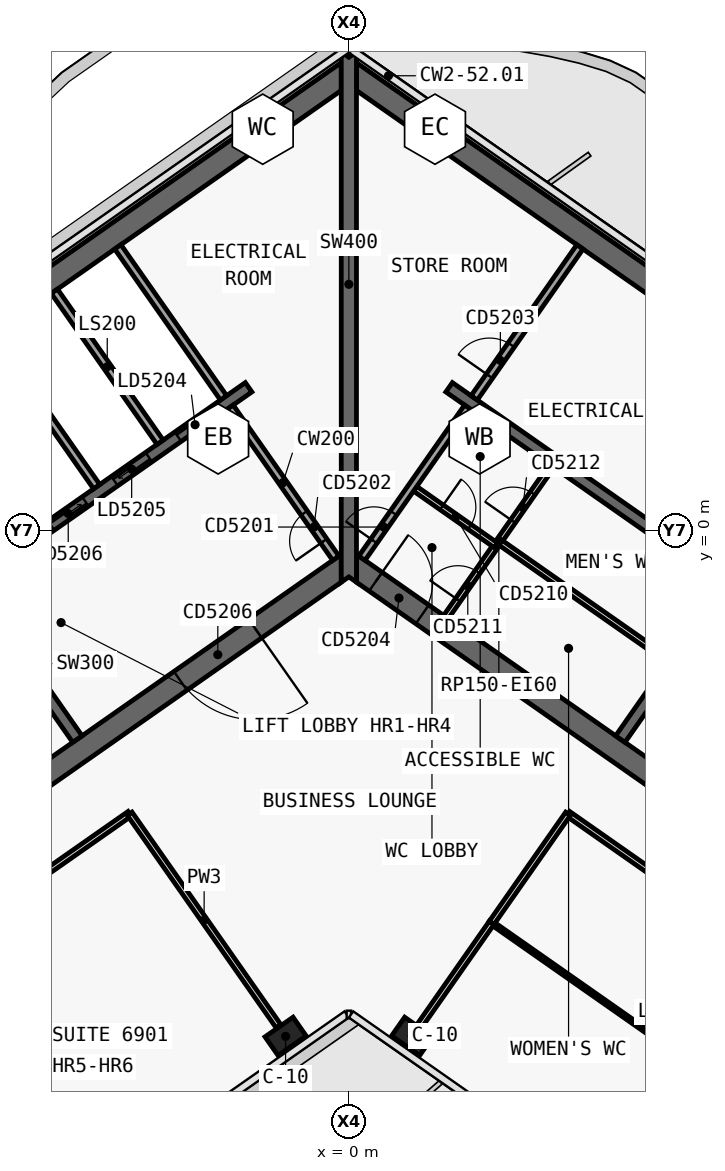
"""IFC4 building model, lengths in metres.
Left out: names, types, materials, properties, quantities, classifications, styles, units other than length and angle.
Written with IfcOpenShell. Run it as: python <this file> out.ifc"""

import sys

from ifc_helpers import new_model, si_unit, direction, frame, frame_2d, origin, origin_2d, place, context, subcontext, project, spatial, polyline, rectangle, outline, extrude, element, fill, save


model = new_model("IFC4")
c1 = context("Model", 3, precision=1e-05, world=origin(), true_north=direction((0.0, 1.0)))
c2 = subcontext(c1, "Body", "Model", "MODEL_VIEW")
j1 = project(units=[si_unit("LENGTHUNIT", "METRE"), si_unit("PLANEANGLEUNIT", "RADIAN")], contexts=[c1])
p1 = place(None, origin())
s1 = spatial("IfcSite", under=j1, at=p1, CompositionType="ELEMENT")
p2 = place(p1, origin())
s2 = spatial("IfcBuilding", under=s1, at=p2, CompositionType="ELEMENT")
p3 = place(p2, frame((0.0, 0.0, 291.7)))
s3 = spatial("IfcBuildingStorey", under=s2, at=p3, CompositionType="ELEMENT", Elevation=291.7)
p4 = place(p3, frame((-0.028, 12.066, 0.0), z_axis=(0.0, 0.0, 1.0), x_axis=(-0.819151382952, -0.573577380837, 0.0)))
e1 = element("IfcWall", 1, at=p4, inside=s3, PredefinedType="SHEAR", context=c2, shape_type="SweptSolid", body=[
    extrude(outline(polyline([(33.898, 0.3), (0.42, 0.3), (0.0, -0.3), (33.898, -0.3), (33.898, 0.3)])), origin(), (0.0, 0.0, 1.0), 3.9),
])
p5 = place(p3, frame((-0.028, -0.874, 0.0), z_axis=(0.0, 0.0, 1.0), x_axis=(-0.819150035022, -0.573579305871, 0.0)))
e2 = element("IfcWall", 2, at=p5, inside=s3, PredefinedType="SHEAR", context=c2, shape_type="SweptSolid", body=[
    extrude(outline(polyline([(26.476, 0.3), (0.42, 0.3), (0.0, -0.3), (26.476, -0.3), (26.476, 0.3)])), origin(), (0.0, 0.0, 1.0), 3.9),
])
p6 = place(p5, frame((2.976, 0.0, 0.0)))
e3 = element("IfcOpeningElement", 3, at=p6, cuts=e2, PredefinedType="OPENING", context=c2, shape_type="SweptSolid", body=[
    extrude(rectangle(XDim=2.4, YDim=2.1, at=frame_2d((1.2, 1.05))), frame((0.0, 0.31, 0.0), z_axis=(0.0, -1.0, 0.0), x_axis=(1.0, 0.0, 0.0)), (0.0, 0.0, 1.0), 0.62),
])
p7 = place(p5, frame((11.776, 0.0, 0.0)))
e4 = element("IfcOpeningElement", 4, at=p7, cuts=e2, PredefinedType="OPENING", context=c2, shape_type="SweptSolid", body=[
    extrude(rectangle(XDim=2.4, YDim=2.1, at=frame_2d((1.2, 1.05))), frame((0.0, 0.31, 0.0), z_axis=(0.0, -1.0, 0.0), x_axis=(1.0, 0.0, 0.0)), (0.0, 0.0, 1.0), 0.62),
])
p8 = place(p3, frame((-7.143, -5.49, 0.0), z_axis=(0.0, 0.0, 1.0), x_axis=(-0.573617744349, 0.819123118565, 0.0)))
e5 = element("IfcWall", 5, at=p8, inside=s3, PredefinedType="SHEAR", context=c2, shape_type="SweptSolid", body=[
    extrude(outline(polyline([(4.85, 0.15), (0.0, 0.15), (0.0, -0.15), (4.85, -0.15), (4.85, 0.15)])), origin(), (0.0, 0.0, 1.0), 3.9),
])
p9 = place(p3, frame((-2.638, 3.768, 0.0), z_axis=(0.0, 0.0, 1.0), x_axis=(-0.819155014212, -0.573572194837, 0.0)))
e6 = element("IfcWall", 6, at=p9, inside=s3, PredefinedType="SHEAR", context=c2, shape_type="SweptSolid", body=[
    extrude(outline(polyline([(26.4, 0.15), (0.0, 0.15), (0.0, -0.15), (26.4, -0.15), (26.4, 0.15)])), origin(), (0.0, 0.0, 1.0), 3.9),
])
p10 = place(p9, frame((1.169, 0.0, 0.0)))
e7 = element("IfcOpeningElement", 7, at=p10, cuts=e6, PredefinedType="OPENING", context=c2, shape_type="SweptSolid", body=[
    extrude(rectangle(XDim=1.1, YDim=2.1, at=frame_2d((0.55, 1.05))), frame((0.0, 0.16, 0.0), z_axis=(0.0, -1.0, 0.0), x_axis=(1.0, 0.0, 0.0)), (0.0, 0.0, 1.0), 0.32),
])
p11 = place(p9, frame((3.206, 0.0, 0.0)))
e8 = element("IfcOpeningElement", 8, at=p11, cuts=e6, PredefinedType="OPENING", context=c2, shape_type="SweptSolid", body=[
    extrude(rectangle(XDim=1.1, YDim=2.1, at=frame_2d((0.55, 1.05))), frame((0.0, 0.16, 0.0), z_axis=(0.0, -1.0, 0.0), x_axis=(1.0, 0.0, 0.0)), (0.0, 0.0, 1.0), 0.32),
])
p12 = place(p9, frame((5.244, 0.0, 0.0)))
e9 = element("IfcOpeningElement", 9, at=p12, cuts=e6, PredefinedType="OPENING", context=c2, shape_type="SweptSolid", body=[
    extrude(rectangle(XDim=1.1, YDim=2.1, at=frame_2d((0.55, 1.05))), frame((0.0, 0.16, 0.0), z_axis=(0.0, -1.0, 0.0), x_axis=(1.0, 0.0, 0.0)), (0.0, 0.0, 1.0), 0.32),
])
p13 = place(p9, frame((7.281, 0.0, 0.0)))
e10 = element("IfcOpeningElement", 10, at=p13, cuts=e6, PredefinedType="OPENING", context=c2, shape_type="SweptSolid", body=[
    extrude(rectangle(XDim=1.1, YDim=2.1, at=frame_2d((0.55, 1.05))), frame((0.0, 0.16, 0.0), z_axis=(0.0, -1.0, 0.0), x_axis=(1.0, 0.0, 0.0)), (0.0, 0.0, 1.0), 0.32),
])
p14 = place(p9, frame((9.688, 0.0, 0.0)))
e11 = element("IfcOpeningElement", 11, at=p14, cuts=e6, PredefinedType="OPENING", context=c2, shape_type="SweptSolid", body=[
    extrude(rectangle(XDim=1.1, YDim=2.1, at=frame_2d((0.55, 1.05))), frame((0.0, 0.16, 0.0), z_axis=(0.0, -1.0, 0.0), x_axis=(1.0, 0.0, 0.0)), (0.0, 0.0, 1.0), 0.32),
])
p15 = place(p9, frame((11.863, 0.0, 0.0)))
e12 = element("IfcOpeningElement", 12, at=p15, cuts=e6, PredefinedType="OPENING", context=c2, shape_type="SweptSolid", body=[
    extrude(rectangle(XDim=1.1, YDim=2.1, at=frame_2d((0.55, 1.05))), frame((0.0, 0.16, 0.0), z_axis=(0.0, -1.0, 0.0), x_axis=(1.0, 0.0, 0.0)), (0.0, 0.0, 1.0), 0.32),
])
p16 = place(p9, frame((15.175, 0.0, 0.0)))
e13 = element("IfcOpeningElement", 13, at=p16, cuts=e6, PredefinedType="OPENING", context=c2, shape_type="SweptSolid", body=[
    extrude(rectangle(XDim=1.0, YDim=2.1, at=frame_2d((0.5, 1.05))), frame((0.0, 0.16, 0.0), z_axis=(0.0, -1.0, 0.0), x_axis=(1.0, 0.0, 0.0)), (0.0, 0.0, 1.0), 0.32),
])
p17 = place(p3, frame((0.028, 12.066, 0.0), z_axis=(0.0, 0.0, 1.0), x_axis=(0.819151382952, -0.573577380837, 0.0)))
e14 = element("IfcWall", 14, at=p17, inside=s3, PredefinedType="SHEAR", context=c2, shape_type="SweptSolid", body=[
    extrude(outline(polyline([(33.898, 0.3), (0.0, 0.3), (0.42, -0.3), (33.898, -0.3), (33.898, 0.3)])), origin(), (0.0, 0.0, 1.0), 3.9),
])
p18 = place(p3, frame((0.028, -0.874, 0.0), z_axis=(0.0, 0.0, 1.0), x_axis=(0.819150035022, -0.573579305871, 0.0)))
e15 = element("IfcWall", 15, at=p18, inside=s3, PredefinedType="SHEAR", context=c2, shape_type="SweptSolid", body=[
    extrude(outline(polyline([(26.476, 0.3), (0.0, 0.3), (0.42, -0.3), (26.476, -0.3), (26.476, 0.3)])), origin(), (0.0, 0.0, 1.0), 3.9),
])
p19 = place(p18, frame((0.826, 0.0, 0.0)))
e16 = element("IfcOpeningElement", 16, at=p19, cuts=e15, PredefinedType="OPENING", context=c2, shape_type="SweptSolid", body=[
    extrude(rectangle(XDim=1.5, YDim=2.1, at=frame_2d((0.75, 1.05))), frame((0.0, 0.31, 0.0), z_axis=(0.0, -1.0, 0.0), x_axis=(1.0, 0.0, 0.0)), (0.0, 0.0, 1.0), 0.62),
])
p20 = place(p18, frame((12.226, 0.0, 0.0)))
e17 = element("IfcOpeningElement", 17, at=p20, cuts=e15, PredefinedType="OPENING", context=c2, shape_type="SweptSolid", body=[
    extrude(rectangle(XDim=1.5, YDim=2.1, at=frame_2d((0.75, 1.05))), frame((0.0, 0.31, 0.0), z_axis=(0.0, -1.0, 0.0), x_axis=(1.0, 0.0, 0.0)), (0.0, 0.0, 1.0), 0.62),
])
p21 = place(p3, frame((7.143, -5.49, 0.0), z_axis=(0.0, 0.0, 1.0), x_axis=(0.573617744349, 0.819123118565, 0.0)))
e18 = element("IfcWall", 18, at=p21, inside=s3, PredefinedType="SHEAR", context=c2, shape_type="SweptSolid", body=[
    extrude(outline(polyline([(0.0, 0.15), (0.0, -0.15), (4.85, -0.15), (4.85, 0.15), (0.0, 0.15)])), origin(), (0.0, 0.0, 1.0), 3.9),
])
p22 = place(p3, frame((2.638, 3.768, 0.0), z_axis=(0.0, 0.0, 1.0), x_axis=(0.819155014212, -0.573572194837, 0.0)))
e19 = element("IfcWall", 19, at=p22, inside=s3, PredefinedType="SHEAR", context=c2, shape_type="SweptSolid", body=[
    extrude(outline(polyline([(0.0, 0.15), (0.0, -0.15), (26.4, -0.15), (26.4, 0.15), (0.0, 0.15)])), origin(), (0.0, 0.0, 1.0), 3.9),
])
p23 = place(p22, frame((9.637, 0.0, 0.0)))
e20 = element("IfcOpeningElement", 20, at=p23, cuts=e19, PredefinedType="OPENING", context=c2, shape_type="SweptSolid", body=[
    extrude(rectangle(XDim=1.2, YDim=2.1, at=frame_2d((0.6, 1.05))), frame((0.0, 0.16, 0.0), z_axis=(0.0, -1.0, 0.0), x_axis=(1.0, 0.0, 0.0)), (0.0, 0.0, 1.0), 0.32),
])
p24 = place(p22, frame((11.812, 0.0, 0.0)))
e21 = element("IfcOpeningElement", 21, at=p24, cuts=e19, PredefinedType="OPENING", context=c2, shape_type="SweptSolid", body=[
    extrude(rectangle(XDim=1.2, YDim=2.1, at=frame_2d((0.6, 1.05))), frame((0.0, 0.16, 0.0), z_axis=(0.0, -1.0, 0.0), x_axis=(1.0, 0.0, 0.0)), (0.0, 0.0, 1.0), 0.32),
])
p25 = place(p22, frame((13.988, 0.0, 0.0)))
e22 = element("IfcOpeningElement", 22, at=p25, cuts=e19, PredefinedType="OPENING", context=c2, shape_type="SweptSolid", body=[
    extrude(rectangle(XDim=1.2, YDim=2.1, at=frame_2d((0.6, 1.05))), frame((0.0, 0.16, 0.0), z_axis=(0.0, -1.0, 0.0), x_axis=(1.0, 0.0, 0.0)), (0.0, 0.0, 1.0), 0.32),
])
p26 = place(p22, frame((16.262, 0.0, 0.0)))
e23 = element("IfcOpeningElement", 23, at=p26, cuts=e19, PredefinedType="OPENING", context=c2, shape_type="SweptSolid", body=[
    extrude(rectangle(XDim=1.0, YDim=2.1, at=frame_2d((0.5, 1.05))), frame((0.0, 0.16, 0.0), z_axis=(0.0, -1.0, 0.0), x_axis=(1.0, 0.0, 0.0)), (0.0, 0.0, 1.0), 0.32),
])
p27 = place(p3, frame((0.0, -1.361, 0.0), z_axis=(0.0, 0.0, 1.0), x_axis=(0.0, 1.0, 0.0)))
e24 = element("IfcWall", 24, at=p27, inside=s3, PredefinedType="SHEAR", context=c2, shape_type="SweptSolid", body=[
    extrude(outline(polyline([(0.14, 0.2), (0.0, 0.2), (0.14, 0.0), (0.0, -0.2), (0.14, -0.2), (1.012, -0.2), (12.94, -0.2), (13.813, -0.2), (13.893, -0.2), (13.933, -0.172), (13.813, 0.0), (13.933, 0.172), (13.893, 0.2), (13.813, 0.2), (12.94, 0.2), (1.012, 0.2), (0.14, 0.2)])), origin(), (0.0, 0.0, 1.0), 3.9),
])
for number, where, z_axis, x_axis in (
    (25, (-1.665, -13.313, 0.0), (0.0, 0.0, 1.0), (-0.819, -0.574, 0.0)),
    (26, (1.665, -13.313, 0.0), (0.0, 0.0, 1.0), (0.819, -0.574, 0.0)),
):
    element("IfcColumn", number, at=place(p3, frame(where, z_axis=z_axis, x_axis=x_axis)), inside=s3, PredefinedType="COLUMN", context=c2, shape_type="SweptSolid", body=[
        extrude(rectangle(XDim=0.9, YDim=0.6, at=origin_2d()), origin(), (0.0, 0.0, 1.0), 3.9),
    ])
p28 = place(p3, frame((-4.967, 2.321, 0.0), z_axis=(0.0, 0.0, 1.0), x_axis=(-0.573594092424, 0.81913968109, 0.0)))
e27 = element("IfcWall", 27, at=p28, inside=s3, PredefinedType="SOLIDWALL", context=c2, shape_type="SweptSolid", body=[
    extrude(rectangle(XDim=4.85, YDim=0.2, at=frame_2d((2.425, 0.0))), origin(), (0.0, 0.0, 1.0), 3.9),
])
p29 = place(p3, frame((-6.636, 1.152, 0.0), z_axis=(0.0, 0.0, 1.0), x_axis=(-0.573560315113, 0.819163332265, 0.0)))
e28 = element("IfcWall", 28, at=p29, inside=s3, PredefinedType="SOLIDWALL", context=c2, shape_type="SweptSolid", body=[
    extrude(rectangle(XDim=4.85, YDim=0.2, at=frame_2d((2.425, 0.0))), origin(), (0.0, 0.0, 1.0), 3.9),
])
p30 = place(p3, frame((2.556, -2.278, 0.0), z_axis=(0.0, 0.0, 1.0), x_axis=(0.573560315113, 0.819163332265, 0.0)))
e29 = element("IfcWall", 29, at=p30, inside=s3, PredefinedType="PARTITIONING", context=c2, shape_type="SweptSolid", body=[
    extrude(rectangle(XDim=4.85, YDim=0.15, at=frame_2d((2.425, 0.0))), origin(), (0.0, 0.0, 1.0), 3.62),
])
p31 = place(p30, frame((0.55, 0.0, 0.0)))
e30 = element("IfcOpeningElement", 30, at=p31, cuts=e29, PredefinedType="OPENING", context=c2, shape_type="SweptSolid", body=[
    extrude(rectangle(XDim=0.9, YDim=2.1, at=frame_2d((0.45, 1.05))), frame((0.0, 0.085, 0.0), z_axis=(0.0, -1.0, 0.0), x_axis=(1.0, 0.0, 0.0)), (0.0, 0.0, 1.0), 0.17),
])
p32 = place(p30, frame((3.075, 0.0, 0.0)))
e31 = element("IfcOpeningElement", 31, at=p32, cuts=e29, PredefinedType="OPENING", context=c2, shape_type="SweptSolid", body=[
    extrude(rectangle(XDim=0.9, YDim=2.1, at=frame_2d((0.45, 1.05))), frame((0.0, 0.085, 0.0), z_axis=(0.0, -1.0, 0.0), x_axis=(1.0, 0.0, 0.0)), (0.0, 0.0, 1.0), 0.17),
])
p33 = place(p3, frame((1.745, 1.097, 0.0), z_axis=(0.0, 0.0, 1.0), x_axis=(0.819178980414, -0.573537965655, 0.0)))
e32 = element("IfcWall", 32, at=p33, inside=s3, PredefinedType="PARTITIONING", context=c2, shape_type="SweptSolid", body=[
    extrude(rectangle(XDim=2.6, YDim=0.15, at=frame_2d((1.3, 0.0))), origin(), (0.0, 0.0, 1.0), 3.62),
])
p34 = place(p33, frame((0.85, 0.0, 0.0)))
e33 = element("IfcOpeningElement", 33, at=p34, cuts=e32, PredefinedType="OPENING", context=c2, shape_type="SweptSolid", body=[
    extrude(rectangle(XDim=0.9, YDim=2.1, at=frame_2d((0.45, 1.05))), frame((0.0, 0.085, 0.0), z_axis=(0.0, -1.0, 0.0), x_axis=(1.0, 0.0, 0.0)), (0.0, 0.0, 1.0), 0.17),
])
p35 = place(p3, frame((3.947, -0.292, 0.0), z_axis=(0.0, 0.0, 1.0), x_axis=(0.819151939971, -0.573576585332, 0.0)))
e34 = element("IfcWall", 34, at=p35, inside=s3, PredefinedType="PARTITIONING", context=c2, shape_type="SweptSolid", body=[
    extrude(rectangle(XDim=5.45, YDim=0.15, at=frame_2d((2.725, 0.0))), origin(), (0.0, 0.0, 1.0), 3.62),
])
p36 = place(p3, frame((-0.344, -0.729, 0.0), z_axis=(0.0, 0.0, 1.0), x_axis=(-0.573560315113, 0.819163332265, 0.0)))
e35 = element("IfcWall", 35, at=p36, inside=s3, PredefinedType="SOLIDWALL", context=c2, shape_type="SweptSolid", body=[
    extrude(rectangle(XDim=4.85, YDim=0.2, at=frame_2d((2.425, 0.0))), origin(), (0.0, 0.0, 1.0), 3.62),
])
p37 = place(p36, frame((0.55, 0.0, 0.0)))
e36 = element("IfcOpeningElement", 36, at=p37, cuts=e35, PredefinedType="OPENING", context=c2, shape_type="SweptSolid", body=[
    extrude(rectangle(XDim=0.9, YDim=2.1, at=frame_2d((0.45, 1.05))), frame((0.0, 0.11, 0.0), z_axis=(0.0, -1.0, 0.0), x_axis=(1.0, 0.0, 0.0)), (0.0, 0.0, 1.0), 0.22),
])
p38 = place(p3, frame((-3.298, 3.49, 0.0), z_axis=(0.0, 0.0, 1.0), x_axis=(-0.573560315113, 0.819163332265, 0.0)))
e37 = element("IfcWall", 37, at=p38, inside=s3, PredefinedType="SOLIDWALL", context=c2, shape_type="SweptSolid", body=[
    extrude(rectangle(XDim=4.85, YDim=0.2, at=frame_2d((2.425, 0.0))), origin(), (0.0, 0.0, 1.0), 3.62),
])
p39 = place(p3, frame((0.344, -0.729, 0.0), z_axis=(0.0, 0.0, 1.0), x_axis=(0.573560315113, 0.819163332265, 0.0)))
e38 = element("IfcWall", 38, at=p39, inside=s3, PredefinedType="SOLIDWALL", context=c2, shape_type="SweptSolid", body=[
    extrude(rectangle(XDim=4.85, YDim=0.2, at=frame_2d((2.425, 0.0))), origin(), (0.0, 0.0, 1.0), 3.62),
])
p40 = place(p39, frame((0.55, 0.0, 0.0)))
e39 = element("IfcOpeningElement", 39, at=p40, cuts=e38, PredefinedType="OPENING", context=c2, shape_type="SweptSolid", body=[
    extrude(rectangle(XDim=0.9, YDim=2.1, at=frame_2d((0.45, 1.05))), frame((0.0, 0.11, 0.0), z_axis=(0.0, -1.0, 0.0), x_axis=(1.0, 0.0, 0.0)), (0.0, 0.0, 1.0), 0.22),
])
p41 = place(p3, frame((3.298, 3.49, 0.0), z_axis=(0.0, 0.0, 1.0), x_axis=(0.573560315113, 0.819163332265, 0.0)))
e40 = element("IfcWall", 40, at=p41, inside=s3, PredefinedType="SOLIDWALL", context=c2, shape_type="SweptSolid", body=[
    extrude(rectangle(XDim=4.85, YDim=0.2, at=frame_2d((2.425, 0.0))), origin(), (0.0, 0.0, 1.0), 3.62),
])
p42 = place(p41, frame((0.7, 0.0, 0.0)))
e41 = element("IfcOpeningElement", 41, at=p42, cuts=e40, PredefinedType="OPENING", context=c2, shape_type="SweptSolid", body=[
    extrude(rectangle(XDim=1.0, YDim=2.1, at=frame_2d((0.5, 1.05))), frame((0.0, 0.11, 0.0), z_axis=(0.0, -1.0, 0.0), x_axis=(1.0, 0.0, 0.0)), (0.0, 0.0, 1.0), 0.22),
])
p43 = place(p3, frame((15.598, -14.34, 0.0), z_axis=(0.0, 0.0, 1.0), x_axis=(-0.81915546166, 0.573571555809, 0.0)))
e42 = element("IfcWall", 42, at=p43, inside=s3, PredefinedType="PARTITIONING", context=c2, shape_type="SweptSolid", body=[
    extrude(rectangle(XDim=12.002, YDim=0.15, at=frame_2d((6.001, 0.0))), origin(), (0.0, 0.0, 1.0), 3.05),
])
p44 = place(p43, frame((5.201, 0.0, 0.0)))
e43 = element("IfcOpeningElement", 43, at=p44, cuts=e42, PredefinedType="OPENING", context=c2, shape_type="SweptSolid", body=[
    extrude(rectangle(XDim=1.6, YDim=2.1, at=frame_2d((0.8, 1.05))), frame((0.0, 0.085, 0.0), z_axis=(0.0, -1.0, 0.0), x_axis=(1.0, 0.0, 0.0)), (0.0, 0.0, 1.0), 0.17),
])
p45 = place(p3, frame((-5.766, -7.456, 0.0), z_axis=(0.0, 0.0, 1.0), x_axis=(-0.81915291695, -0.57357519006, 0.0)))
e44 = element("IfcWall", 44, at=p45, inside=s3, PredefinedType="PARTITIONING", context=c2, shape_type="SweptSolid", body=[
    extrude(rectangle(XDim=9.002, YDim=0.15, at=frame_2d((4.501, 0.0))), origin(), (0.0, 0.0, 1.0), 3.05),
])
p46 = place(p45, frame((3.701, 0.0, 0.0)))
e45 = element("IfcOpeningElement", 45, at=p46, cuts=e44, PredefinedType="OPENING", context=c2, shape_type="SweptSolid", body=[
    extrude(rectangle(XDim=1.6, YDim=2.1, at=frame_2d((0.8, 1.05))), frame((0.0, 0.085, 0.0), z_axis=(0.0, -1.0, 0.0), x_axis=(1.0, 0.0, 0.0)), (0.0, 0.0, 1.0), 0.17),
])
p47 = place(p3, frame((13.588, -17.207, 0.0), z_axis=(0.0, 0.0, 1.0), x_axis=(-0.819156404271, 0.573570209602, 0.0)))
e46 = element("IfcWall", 46, at=p47, inside=s3, PredefinedType="PARTITIONING", context=c2, shape_type="SweptSolid", body=[
    extrude(rectangle(XDim=12.0, YDim=0.1, at=frame_2d((6.0, 0.0))), origin(), (0.0, 0.0, 1.0), 3.05),
])
p48 = place(p47, frame((5.55, 0.0, 0.0)))
e47 = element("IfcOpeningElement", 47, at=p48, cuts=e46, PredefinedType="OPENING", context=c2, shape_type="SweptSolid", body=[
    extrude(rectangle(XDim=0.9, YDim=2.1, at=frame_2d((0.45, 1.05))), frame((0.0, 0.06, 0.0), z_axis=(0.0, -1.0, 0.0), x_axis=(1.0, 0.0, 0.0)), (0.0, 0.0, 1.0), 0.12),
])
p49 = place(p3, frame((1.849, -13.051, 0.0), z_axis=(0.0, 0.0, 1.0), x_axis=(0.573595235521, 0.819138880647, 0.0)))
e48 = element("IfcWall", 48, at=p49, inside=s3, PredefinedType="PARTITIONING", context=c2, shape_type="SweptSolid", body=[
    extrude(rectangle(XDim=3.329, YDim=0.15, at=frame_2d((1.665, 0.0))), origin(), (0.0, 0.0, 1.0), 3.05),
])
p50 = place(p3, frame((3.759, -10.323, 0.0), z_axis=(0.0, 0.0, 1.0), x_axis=(0.573598101901, 0.81913687348, 0.0)))
e49 = element("IfcWall", 49, at=p50, inside=s3, PredefinedType="PARTITIONING", context=c2, shape_type="SweptSolid", body=[
    extrude(rectangle(XDim=3.5, YDim=0.15, at=frame_2d((1.75, 0.0))), origin(), (0.0, 0.0, 1.0), 3.05),
])
p51 = place(p3, frame((-1.849, -13.051, 0.0), z_axis=(0.0, 0.0, 1.0), x_axis=(-0.57357985571, 0.819149650018, 0.0)))
e50 = element("IfcWall", 50, at=p51, inside=s3, PredefinedType="PARTITIONING", context=c2, shape_type="SweptSolid", body=[
    extrude(rectangle(XDim=6.832, YDim=0.15, at=frame_2d((3.416, 0.0))), origin(), (0.0, 0.0, 1.0), 3.05),
])
p52 = place(p10, origin())
e51 = element("IfcDoor", 51, at=p52, inside=s3, OperationType="SLIDING_TO_LEFT", PredefinedType="DOOR", context=c2, shape_type="SweptSolid", body=[
    extrude(rectangle(XDim=1.1, YDim=2.1, at=frame_2d((0.55, 1.05))), frame((0.0, 0.025, 0.0), z_axis=(0.0, -1.0, 0.0), x_axis=(1.0, 0.0, 0.0)), (0.0, 0.0, 1.0), 0.05),
])
fill(e7, e51)
p53 = place(p11, origin())
e52 = element("IfcDoor", 52, at=p53, inside=s3, OperationType="SLIDING_TO_RIGHT", PredefinedType="DOOR", context=c2, shape_type="SweptSolid", body=[
    extrude(rectangle(XDim=1.1, YDim=2.1, at=frame_2d((0.55, 1.05))), frame((0.0, 0.025, 0.0), z_axis=(0.0, -1.0, 0.0), x_axis=(1.0, 0.0, 0.0)), (0.0, 0.0, 1.0), 0.05),
])
fill(e8, e52)
p54 = place(p12, origin())
e53 = element("IfcDoor", 53, at=p54, inside=s3, OperationType="SLIDING_TO_LEFT", PredefinedType="DOOR", context=c2, shape_type="SweptSolid", body=[
    extrude(rectangle(XDim=1.1, YDim=2.1, at=frame_2d((0.55, 1.05))), frame((0.0, 0.025, 0.0), z_axis=(0.0, -1.0, 0.0), x_axis=(1.0, 0.0, 0.0)), (0.0, 0.0, 1.0), 0.05),
])
fill(e9, e53)
p55 = place(p6, origin())
e54 = element("IfcDoor", 54, at=p55, inside=s3, OperationType="DOUBLE_DOOR_SINGLE_SWING", PredefinedType="DOOR", context=c2, shape_type="SweptSolid", body=[
    extrude(rectangle(XDim=2.4, YDim=2.1, at=frame_2d((1.2, 1.05))), frame((0.0, 0.025, 0.0), z_axis=(0.0, -1.0, 0.0), x_axis=(1.0, 0.0, 0.0)), (0.0, 0.0, 1.0), 0.05),
])
fill(e3, e54)
p56 = place(p31, origin())
e55 = element("IfcDoor", 55, at=p56, inside=s3, OperationType="SINGLE_SWING_RIGHT", PredefinedType="DOOR", context=c2, shape_type="SweptSolid", body=[
    extrude(rectangle(XDim=0.9, YDim=2.1, at=frame_2d((0.45, 1.05))), frame((0.0, 0.025, 0.0), z_axis=(0.0, -1.0, 0.0), x_axis=(1.0, 0.0, 0.0)), (0.0, 0.0, 1.0), 0.05),
])
fill(e30, e55)
p57 = place(p34, origin())
e56 = element("IfcDoor", 56, at=p57, inside=s3, OperationType="SINGLE_SWING_RIGHT", PredefinedType="DOOR", context=c2, shape_type="SweptSolid", body=[
    extrude(rectangle(XDim=0.9, YDim=2.1, at=frame_2d((0.45, 1.05))), frame((0.0, 0.025, 0.0), z_axis=(0.0, -1.0, 0.0), x_axis=(1.0, 0.0, 0.0)), (0.0, 0.0, 1.0), 0.05),
])
fill(e33, e56)
p58 = place(p32, origin())
e57 = element("IfcDoor", 57, at=p58, inside=s3, OperationType="SINGLE_SWING_RIGHT", PredefinedType="DOOR", context=c2, shape_type="SweptSolid", body=[
    extrude(rectangle(XDim=0.9, YDim=2.1, at=frame_2d((0.45, 1.05))), frame((0.0, 0.025, 0.0), z_axis=(0.0, -1.0, 0.0), x_axis=(1.0, 0.0, 0.0)), (0.0, 0.0, 1.0), 0.05),
])
fill(e31, e57)
p59 = place(p19, origin())
e58 = element("IfcDoor", 58, at=p59, inside=s3, OperationType="SINGLE_SWING_RIGHT", PredefinedType="DOOR", context=c2, shape_type="SweptSolid", body=[
    extrude(rectangle(XDim=1.5, YDim=2.1, at=frame_2d((0.75, 1.05))), frame((0.0, 0.025, 0.0), z_axis=(0.0, -1.0, 0.0), x_axis=(1.0, 0.0, 0.0)), (0.0, 0.0, 1.0), 0.05),
])
fill(e16, e58)
p60 = place(p37, origin())
e59 = element("IfcDoor", 59, at=p60, inside=s3, OperationType="SINGLE_SWING_RIGHT", PredefinedType="DOOR", context=c2, shape_type="SweptSolid", body=[
    extrude(rectangle(XDim=0.9, YDim=2.1, at=frame_2d((0.45, 1.05))), frame((0.0, 0.025, 0.0), z_axis=(0.0, -1.0, 0.0), x_axis=(1.0, 0.0, 0.0)), (0.0, 0.0, 1.0), 0.05),
])
fill(e36, e59)
p61 = place(p40, origin())
e60 = element("IfcDoor", 60, at=p61, inside=s3, OperationType="SINGLE_SWING_RIGHT", PredefinedType="DOOR", context=c2, shape_type="SweptSolid", body=[
    extrude(rectangle(XDim=0.9, YDim=2.1, at=frame_2d((0.45, 1.05))), frame((0.0, 0.025, 0.0), z_axis=(0.0, -1.0, 0.0), x_axis=(1.0, 0.0, 0.0)), (0.0, 0.0, 1.0), 0.05),
])
fill(e39, e60)
p62 = place(p42, origin())
e61 = element("IfcDoor", 61, at=p62, inside=s3, OperationType="SINGLE_SWING_RIGHT", PredefinedType="DOOR", context=c2, shape_type="SweptSolid", body=[
    extrude(rectangle(XDim=1.0, YDim=2.1, at=frame_2d((0.5, 1.05))), frame((0.0, 0.025, 0.0), z_axis=(0.0, -1.0, 0.0), x_axis=(1.0, 0.0, 0.0)), (0.0, 0.0, 1.0), 0.05),
])
fill(e41, e61)
save(model, sys.argv[1])
